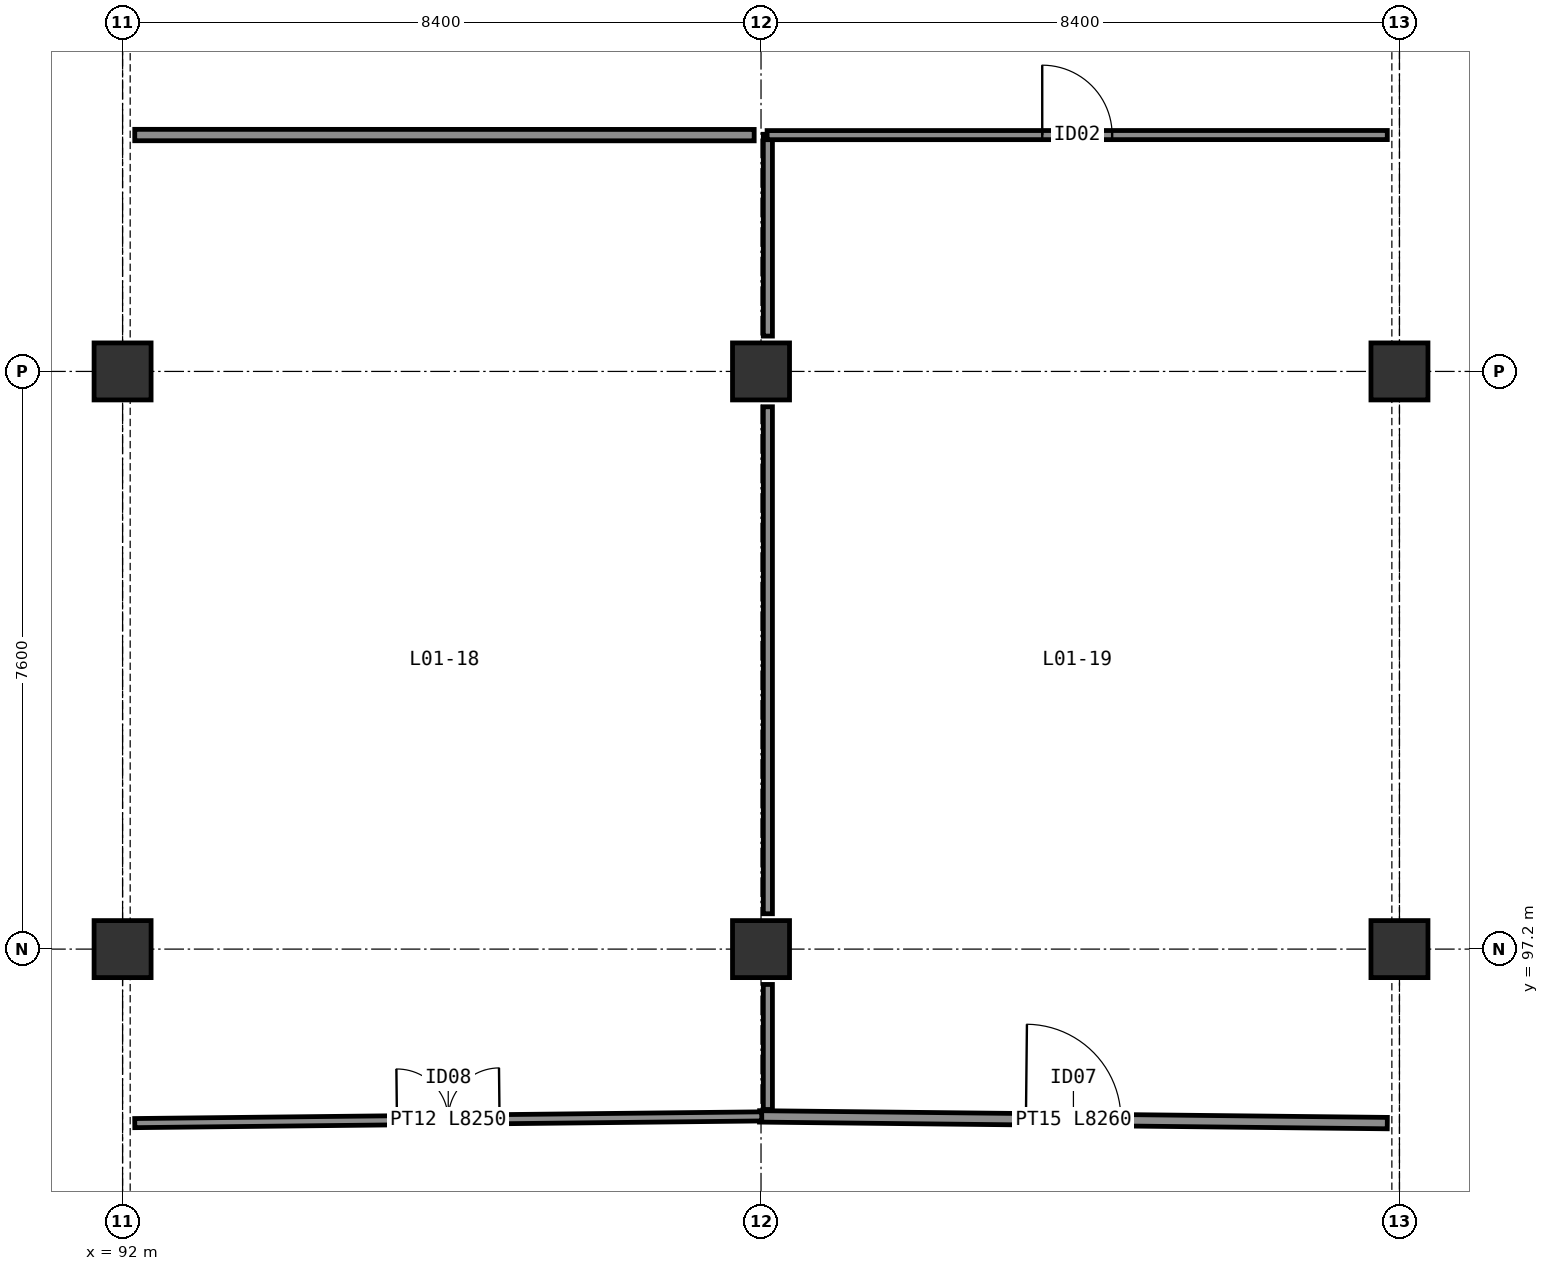
"""IFC4 building model, lengths in metres.
Left out: names, types, materials, properties, quantities, classifications, styles, units other than length and angle.
Written with IfcOpenShell. Run it as: python <this file> out.ifc"""

import sys

from ifc_helpers import new_model, si_unit, direction, frame, frame_2d, origin, origin_2d, place, context, subcontext, project, spatial, rectangle, extrude, element, fill, save


model = new_model("IFC4")
c1 = context("Model", 3, precision=1e-05, world=origin(), true_north=direction((0.0, 1.0)))
c2 = subcontext(c1, "Body", "Model", "MODEL_VIEW")
j1 = project(units=[si_unit("LENGTHUNIT", "METRE"), si_unit("PLANEANGLEUNIT", "RADIAN")], contexts=[c1])
p1 = place(None, origin())
s1 = spatial("IfcSite", under=j1, at=p1, CompositionType="ELEMENT")
p2 = place(p1, origin())
s2 = spatial("IfcBuilding", under=s1, at=p2, CompositionType="ELEMENT")
p3 = place(p2, frame((0.0, 0.0, 4.8)))
s3 = spatial("IfcBuildingStorey", under=s2, at=p3, CompositionType="ELEMENT", Elevation=4.8)
for number, where, z_axis, x_axis in (
    (1, (92.0, 97.2, 0.0), (0.0, 0.0, 1.0), (1.0, 0.0, 0.0)),
    (2, (100.4, 97.2, 0.0), (0.0, 0.0, 1.0), (1.0, 0.0, 0.0)),
    (3, (108.8, 97.2, 0.0), (0.0, 0.0, 1.0), (1.0, 0.0, 0.0)),
    (4, (92.0, 104.8, 0.0), (0.0, 0.0, 1.0), (1.0, 0.0, 0.0)),
    (5, (100.4, 104.8, 0.0), (0.0, 0.0, 1.0), (1.0, 0.0, 0.0)),
    (6, (108.8, 104.8, 0.0), (0.0, 0.0, 1.0), (1.0, 0.0, 0.0)),
):
    element("IfcColumn", number, at=place(p3, frame(where, z_axis=z_axis, x_axis=x_axis)), inside=s3, PredefinedType="COLUMN", context=c2, shape_type="SweptSolid", body=[
        extrude(rectangle(XDim=0.75, YDim=0.75, at=origin_2d()), origin(), (0.0, 0.0, 1.0), 4.8),
    ])
p4 = place(p3, frame((100.381, 94.999, 0.0), z_axis=(0.0, 0.0, 1.0), x_axis=(0.999943069719, -0.010670394566, 0.0)))
e7 = element("IfcWall", 7, at=p4, inside=s3, PredefinedType="PARTITIONING", context=c2, shape_type="SweptSolid", body=[
    extrude(rectangle(XDim=8.26, YDim=0.15, at=frame_2d((4.13, 0.0))), origin(), (0.0, 0.0, 1.0), 4.43),
])
p5 = place(p4, frame((3.505, 0.0, 0.0)))
e8 = element("IfcOpeningElement", 8, at=p5, cuts=e7, PredefinedType="OPENING", context=c2, shape_type="SweptSolid", body=[
    extrude(rectangle(XDim=1.25, YDim=2.12, at=frame_2d((0.625, 1.06))), frame((0.0, 0.085, 0.0), z_axis=(0.0, -1.0, 0.0), x_axis=(1.0, 0.0, 0.0)), (0.0, 0.0, 1.0), 0.17),
])
p6 = place(p3, frame((92.16, 94.911, 0.0), z_axis=(0.0, 0.0, 1.0), x_axis=(0.999942934865, 0.010683024548, 0.0)))
e9 = element("IfcWall", 9, at=p6, inside=s3, PredefinedType="PARTITIONING", context=c2, shape_type="SweptSolid", body=[
    extrude(rectangle(XDim=8.25, YDim=0.12, at=frame_2d((4.125, 0.0))), origin(), (0.0, 0.0, 1.0), 4.43),
])
p7 = place(p6, frame((3.45, 0.0, 0.0)))
e10 = element("IfcOpeningElement", 10, at=p7, cuts=e9, PredefinedType="OPENING", context=c2, shape_type="SweptSolid", body=[
    extrude(rectangle(XDim=1.35, YDim=2.18, at=frame_2d((0.675, 1.09))), frame((0.0, 0.07, 0.0), z_axis=(0.0, -1.0, 0.0), x_axis=(1.0, 0.0, 0.0)), (0.0, 0.0, 1.0), 0.14),
])
p8 = place(p3, frame((100.49, 97.665, 0.0), z_axis=(0.0, 0.0, 1.0), x_axis=(0.0, 1.0, 0.0)))
e11 = element("IfcWall", 11, at=p8, inside=s3, PredefinedType="PARTITIONING", context=c2, shape_type="SweptSolid", body=[
    extrude(rectangle(XDim=6.67, YDim=0.12, at=frame_2d((3.335, 0.0))), origin(), (0.0, 0.0, 1.0), 4.43),
])
p9 = place(p3, frame((100.49, 105.265, 0.0), z_axis=(0.0, 0.0, 1.0), x_axis=(0.0, 1.0, 0.0)))
e12 = element("IfcWall", 12, at=p9, inside=s3, PredefinedType="PARTITIONING", context=c2, shape_type="SweptSolid", body=[
    extrude(rectangle(XDim=2.655, YDim=0.12, at=frame_2d((1.328, 0.0))), origin(), (0.0, 0.0, 1.0), 4.43),
])
p10 = place(p3, frame((100.49, 95.09, 0.0), z_axis=(0.0, 0.0, 1.0), x_axis=(0.0, 1.0, 0.0)))
e13 = element("IfcWall", 13, at=p10, inside=s3, PredefinedType="PARTITIONING", context=c2, shape_type="SweptSolid", body=[
    extrude(rectangle(XDim=1.645, YDim=0.12, at=frame_2d((0.823, 0.0))), origin(), (0.0, 0.0, 1.0), 4.43),
])
p11 = place(p3, frame((100.48, 107.909, 0.0), z_axis=(0.0, 0.0, 1.0), x_axis=(0.99999998881, 0.000149597581, 0.0)))
e14 = element("IfcWall", 14, at=p11, inside=s3, PredefinedType="PARTITIONING", context=c2, shape_type="SweptSolid", body=[
    extrude(rectangle(XDim=8.16, YDim=0.12, at=frame_2d((4.08, 0.0))), origin(), (0.0, 0.0, 1.0), 3.287),
])
p12 = place(p11, frame((3.62, 0.0, 0.0)))
e15 = element("IfcOpeningElement", 15, at=p12, cuts=e14, PredefinedType="OPENING", context=c2, shape_type="SweptSolid", body=[
    extrude(rectangle(XDim=0.92, YDim=2.08, at=frame_2d((0.46, 1.04))), frame((0.0, 0.07, 0.0), z_axis=(0.0, -1.0, 0.0), x_axis=(1.0, 0.0, 0.0)), (0.0, 0.0, 1.0), 0.14),
])
p13 = place(p3, frame((92.16, 107.91, 0.0), z_axis=(0.0, 0.0, 1.0), x_axis=(0.999999988783, -0.000149776831, 0.0)))
e16 = element("IfcWall", 16, at=p13, inside=s3, PredefinedType="PARTITIONING", context=c2, shape_type="SweptSolid", body=[
    extrude(rectangle(XDim=8.15, YDim=0.15, at=frame_2d((4.075, 0.0))), origin(), (0.0, 0.0, 1.0), 3.287),
])
p14 = place(p5, origin())
e17 = element("IfcDoor", 17, at=p14, inside=s3, OperationType="SINGLE_SWING_LEFT", PredefinedType="DOOR", context=c2, shape_type="SweptSolid", body=[
    extrude(rectangle(XDim=1.25, YDim=2.12, at=frame_2d((0.625, 1.06))), frame((0.0, 0.025, 0.0), z_axis=(0.0, -1.0, 0.0), x_axis=(1.0, 0.0, 0.0)), (0.0, 0.0, 1.0), 0.05),
])
fill(e8, e17)
p15 = place(p7, origin())
e18 = element("IfcDoor", 18, at=p15, inside=s3, OperationType="DOUBLE_DOOR_SINGLE_SWING", PredefinedType="DOOR", context=c2, shape_type="SweptSolid", body=[
    extrude(rectangle(XDim=1.35, YDim=2.18, at=frame_2d((0.675, 1.09))), frame((0.0, 0.025, 0.0), z_axis=(0.0, -1.0, 0.0), x_axis=(1.0, 0.0, 0.0)), (0.0, 0.0, 1.0), 0.05),
])
fill(e10, e18)
p16 = place(p12, origin())
e19 = element("IfcDoor", 19, at=p16, inside=s3, OperationType="SINGLE_SWING_LEFT", PredefinedType="DOOR", context=c2, shape_type="SweptSolid", body=[
    extrude(rectangle(XDim=0.92, YDim=2.08, at=frame_2d((0.46, 1.04))), frame((0.0, 0.025, 0.0), z_axis=(0.0, -1.0, 0.0), x_axis=(1.0, 0.0, 0.0)), (0.0, 0.0, 1.0), 0.05),
])
fill(e15, e19)
save(model, sys.argv[1])
